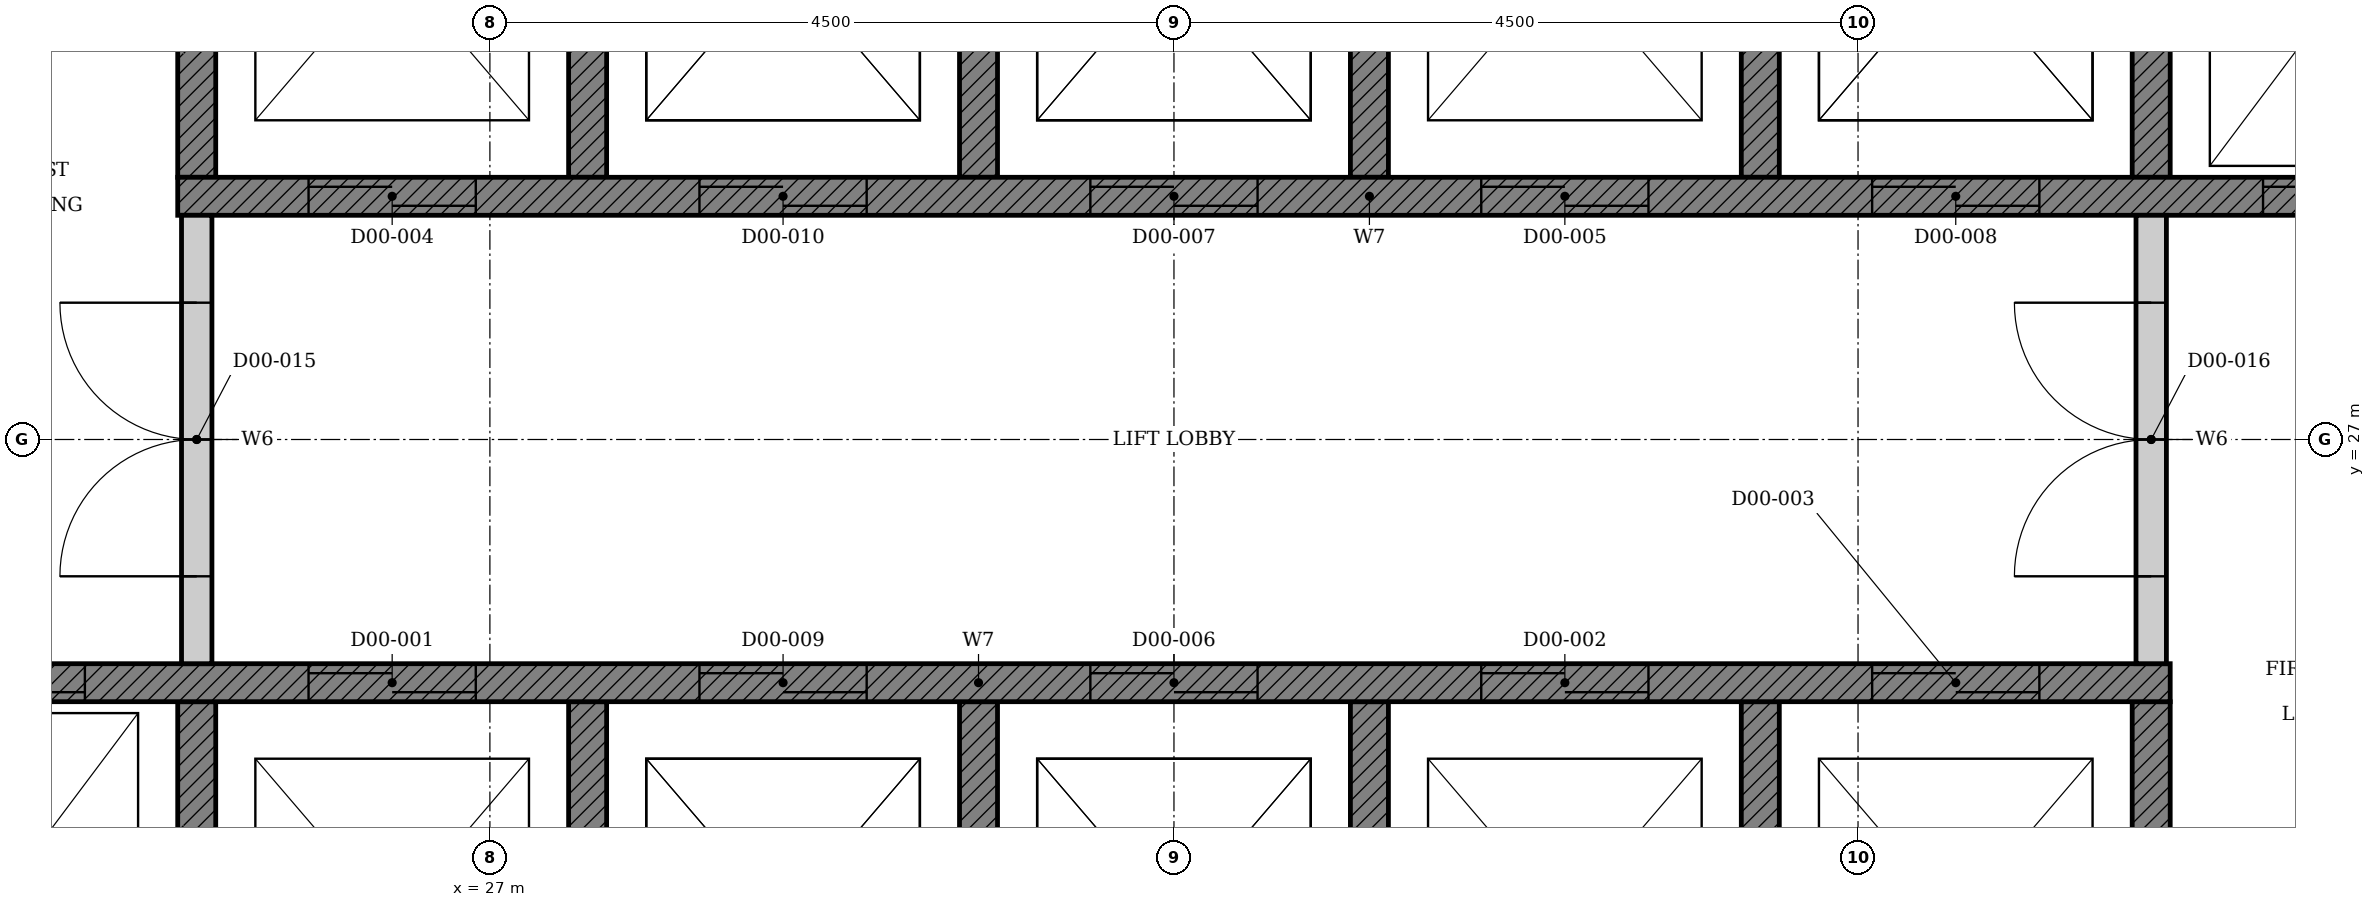
"""IFC4 building model, lengths in metres.
Left out: names, types, materials, properties, quantities, classifications, styles, units other than length and angle.
Written with IfcOpenShell. Run it as: python <this file> out.ifc"""

import sys

from ifc_helpers import new_model, si_unit, direction, frame, frame_2d, origin, place, context, subcontext, project, spatial, polyline, rectangle, outline, extrude, element, fill, save


model = new_model("IFC4")
c1 = context("Model", 3, precision=1e-05, world=origin(), true_north=direction((0.0, 1.0)))
c2 = subcontext(c1, "Body", "Model", "MODEL_VIEW")
j1 = project(units=[si_unit("LENGTHUNIT", "METRE"), si_unit("PLANEANGLEUNIT", "RADIAN")], contexts=[c1])
p1 = place(None, origin())
s1 = spatial("IfcSite", under=j1, at=p1, CompositionType="ELEMENT")
p2 = place(p1, origin())
s2 = spatial("IfcBuilding", under=s1, at=p2, CompositionType="ELEMENT")
p3 = place(p2, origin())
s3 = spatial("IfcBuildingStorey", under=s2, at=p3, CompositionType="ELEMENT", Elevation=0.0)
p4 = place(p3, origin())
e1 = element("IfcWall", 1, at=p4, inside=s3, PredefinedType="SHEAR", context=c2, shape_type="SweptSolid", body=[
    extrude(outline(polyline([(22.375, 22.35), (38.053, 22.35), (38.053, 25.275), (37.803, 25.275), (37.803, 22.65), (35.482, 22.65), (35.482, 25.275), (35.232, 25.275), (35.232, 22.65), (32.911, 22.65), (32.911, 25.275), (32.661, 25.275), (32.661, 22.65), (30.339, 22.65), (30.339, 25.275), (30.089, 25.275), (30.089, 22.65), (27.768, 22.65), (27.768, 25.275), (27.518, 25.275), (27.518, 22.65), (25.197, 22.65), (25.197, 25.275), (24.947, 25.275), (24.947, 22.65), (22.625, 22.65), (22.625, 25.275), (22.375, 25.275), (22.375, 22.35)])), origin(), (0.0, 0.0, 1.0), 6.25),
])
p5 = place(p3, origin())
e2 = element("IfcWall", 2, at=p5, inside=s3, PredefinedType="SHEAR", context=c2, shape_type="SweptSolid", body=[
    extrude(outline(polyline([(24.947, 28.725), (25.197, 28.725), (25.197, 31.35), (27.518, 31.35), (27.518, 28.725), (27.768, 28.725), (27.768, 31.35), (30.089, 31.35), (30.089, 28.725), (30.339, 28.725), (30.339, 31.35), (32.661, 31.35), (32.661, 28.725), (32.911, 28.725), (32.911, 31.35), (35.232, 31.35), (35.232, 28.725), (35.482, 28.725), (35.482, 31.35), (37.803, 31.35), (37.803, 28.725), (38.053, 28.725), (38.053, 31.35), (40.375, 31.35), (40.375, 28.725), (40.625, 28.725), (40.625, 31.65), (24.947, 31.65), (24.947, 28.725)])), origin(), (0.0, 0.0, 1.0), 6.25),
])
p6 = place(p3, frame((22.375, 25.4, 0.0), z_axis=(0.0, 0.0, 1.0), x_axis=(1.0, 0.0, 0.0)))
e3 = element("IfcWall", 3, at=p6, inside=s3, PredefinedType="SHEAR", context=c2, shape_type="SweptSolid", body=[
    extrude(rectangle(XDim=15.678, YDim=0.25, at=frame_2d((7.839, 0.0))), origin(), (0.0, 0.0, 1.0), 6.25),
])
p7 = place(p6, frame((3.432, 0.0, 0.0)))
e4 = element("IfcOpeningElement", 4, at=p7, cuts=e3, PredefinedType="OPENING", context=c2, shape_type="SweptSolid", body=[
    extrude(rectangle(XDim=1.1, YDim=2.1, at=frame_2d((0.55, 1.05))), frame((0.0, 0.135, 0.0), z_axis=(0.0, -1.0, 0.0), x_axis=(1.0, 0.0, 0.0)), (0.0, 0.0, 1.0), 0.27),
])
p8 = place(p6, frame((11.146, 0.0, 0.0)))
e5 = element("IfcOpeningElement", 5, at=p8, cuts=e3, PredefinedType="OPENING", context=c2, shape_type="SweptSolid", body=[
    extrude(rectangle(XDim=1.1, YDim=2.1, at=frame_2d((0.55, 1.05))), frame((0.0, 0.135, 0.0), z_axis=(0.0, -1.0, 0.0), x_axis=(1.0, 0.0, 0.0)), (0.0, 0.0, 1.0), 0.27),
])
p9 = place(p6, frame((13.718, 0.0, 0.0)))
e6 = element("IfcOpeningElement", 6, at=p9, cuts=e3, PredefinedType="OPENING", context=c2, shape_type="SweptSolid", body=[
    extrude(rectangle(XDim=1.1, YDim=2.1, at=frame_2d((0.55, 1.05))), frame((0.0, 0.135, 0.0), z_axis=(0.0, -1.0, 0.0), x_axis=(1.0, 0.0, 0.0)), (0.0, 0.0, 1.0), 0.27),
])
p10 = place(p6, frame((8.575, 0.0, 0.0)))
e7 = element("IfcOpeningElement", 7, at=p10, cuts=e3, PredefinedType="OPENING", context=c2, shape_type="SweptSolid", body=[
    extrude(rectangle(XDim=1.1, YDim=2.1, at=frame_2d((0.55, 1.05))), frame((0.0, 0.135, 0.0), z_axis=(0.0, -1.0, 0.0), x_axis=(1.0, 0.0, 0.0)), (0.0, 0.0, 1.0), 0.27),
])
p11 = place(p6, frame((6.004, 0.0, 0.0)))
e8 = element("IfcOpeningElement", 8, at=p11, cuts=e3, PredefinedType="OPENING", context=c2, shape_type="SweptSolid", body=[
    extrude(rectangle(XDim=1.1, YDim=2.1, at=frame_2d((0.55, 1.05))), frame((0.0, 0.135, 0.0), z_axis=(0.0, -1.0, 0.0), x_axis=(1.0, 0.0, 0.0)), (0.0, 0.0, 1.0), 0.27),
])
p12 = place(p6, frame((0.861, 0.0, 0.0)))
e9 = element("IfcOpeningElement", 9, at=p12, cuts=e3, PredefinedType="OPENING", context=c2, shape_type="SweptSolid", body=[
    extrude(rectangle(XDim=1.1, YDim=2.1, at=frame_2d((0.55, 1.05))), frame((0.0, 0.135, 0.0), z_axis=(0.0, -1.0, 0.0), x_axis=(1.0, 0.0, 0.0)), (0.0, 0.0, 1.0), 0.27),
])
p13 = place(p3, frame((24.947, 28.6, 0.0), z_axis=(0.0, 0.0, 1.0), x_axis=(1.0, 0.0, 0.0)))
e10 = element("IfcWall", 10, at=p13, inside=s3, PredefinedType="SHEAR", context=c2, shape_type="SweptSolid", body=[
    extrude(rectangle(XDim=15.678, YDim=0.25, at=frame_2d((7.839, 0.0))), origin(), (0.0, 0.0, 1.0), 6.25),
])
p14 = place(p13, frame((0.861, 0.0, 0.0)))
e11 = element("IfcOpeningElement", 11, at=p14, cuts=e10, PredefinedType="OPENING", context=c2, shape_type="SweptSolid", body=[
    extrude(rectangle(XDim=1.1, YDim=2.1, at=frame_2d((0.55, 1.05))), frame((0.0, 0.135, 0.0), z_axis=(0.0, -1.0, 0.0), x_axis=(1.0, 0.0, 0.0)), (0.0, 0.0, 1.0), 0.27),
])
p15 = place(p13, frame((8.575, 0.0, 0.0)))
e12 = element("IfcOpeningElement", 12, at=p15, cuts=e10, PredefinedType="OPENING", context=c2, shape_type="SweptSolid", body=[
    extrude(rectangle(XDim=1.1, YDim=2.1, at=frame_2d((0.55, 1.05))), frame((0.0, 0.135, 0.0), z_axis=(0.0, -1.0, 0.0), x_axis=(1.0, 0.0, 0.0)), (0.0, 0.0, 1.0), 0.27),
])
p16 = place(p13, frame((6.004, 0.0, 0.0)))
e13 = element("IfcOpeningElement", 13, at=p16, cuts=e10, PredefinedType="OPENING", context=c2, shape_type="SweptSolid", body=[
    extrude(rectangle(XDim=1.1, YDim=2.1, at=frame_2d((0.55, 1.05))), frame((0.0, 0.135, 0.0), z_axis=(0.0, -1.0, 0.0), x_axis=(1.0, 0.0, 0.0)), (0.0, 0.0, 1.0), 0.27),
])
p17 = place(p13, frame((11.146, 0.0, 0.0)))
e14 = element("IfcOpeningElement", 14, at=p17, cuts=e10, PredefinedType="OPENING", context=c2, shape_type="SweptSolid", body=[
    extrude(rectangle(XDim=1.1, YDim=2.1, at=frame_2d((0.55, 1.05))), frame((0.0, 0.135, 0.0), z_axis=(0.0, -1.0, 0.0), x_axis=(1.0, 0.0, 0.0)), (0.0, 0.0, 1.0), 0.27),
])
p18 = place(p13, frame((3.432, 0.0, 0.0)))
e15 = element("IfcOpeningElement", 15, at=p18, cuts=e10, PredefinedType="OPENING", context=c2, shape_type="SweptSolid", body=[
    extrude(rectangle(XDim=1.1, YDim=2.1, at=frame_2d((0.55, 1.05))), frame((0.0, 0.135, 0.0), z_axis=(0.0, -1.0, 0.0), x_axis=(1.0, 0.0, 0.0)), (0.0, 0.0, 1.0), 0.27),
])
p19 = place(p13, frame((13.718, 0.0, 0.0)))
e16 = element("IfcOpeningElement", 16, at=p19, cuts=e10, PredefinedType="OPENING", context=c2, shape_type="SweptSolid", body=[
    extrude(rectangle(XDim=1.1, YDim=2.1, at=frame_2d((0.55, 1.05))), frame((0.0, 0.135, 0.0), z_axis=(0.0, -1.0, 0.0), x_axis=(1.0, 0.0, 0.0)), (0.0, 0.0, 1.0), 0.27),
])
p20 = place(p3, frame((25.072, 25.525, 0.0), z_axis=(0.0, 0.0, 1.0), x_axis=(0.0, 1.0, 0.0)))
e17 = element("IfcWall", 17, at=p20, inside=s3, PredefinedType="PARTITIONING", context=c2, shape_type="SweptSolid", body=[
    extrude(rectangle(XDim=2.95, YDim=0.2, at=frame_2d((1.475, 0.0))), origin(), (0.0, 0.0, 1.0), 6.25),
])
p21 = place(p20, frame((0.575, 0.0, 0.0)))
e18 = element("IfcOpeningElement", 18, at=p21, cuts=e17, PredefinedType="OPENING", context=c2, shape_type="SweptSolid", body=[
    extrude(rectangle(XDim=1.8, YDim=2.1, at=frame_2d((0.9, 1.05))), frame((0.0, 0.11, 0.0), z_axis=(0.0, -1.0, 0.0), x_axis=(1.0, 0.0, 0.0)), (0.0, 0.0, 1.0), 0.22),
])
p22 = place(p3, frame((37.928, 25.525, 0.0), z_axis=(0.0, 0.0, 1.0), x_axis=(0.0, 1.0, 0.0)))
e19 = element("IfcWall", 19, at=p22, inside=s3, PredefinedType="PARTITIONING", context=c2, shape_type="SweptSolid", body=[
    extrude(rectangle(XDim=2.95, YDim=0.2, at=frame_2d((1.475, 0.0))), origin(), (0.0, 0.0, 1.0), 6.25),
])
p23 = place(p22, frame((0.575, 0.0, 0.0)))
e20 = element("IfcOpeningElement", 20, at=p23, cuts=e19, PredefinedType="OPENING", context=c2, shape_type="SweptSolid", body=[
    extrude(rectangle(XDim=1.8, YDim=2.1, at=frame_2d((0.9, 1.05))), frame((0.0, 0.11, 0.0), z_axis=(0.0, -1.0, 0.0), x_axis=(1.0, 0.0, 0.0)), (0.0, 0.0, 1.0), 0.22),
])
p24 = place(p7, origin())
e21 = element("IfcDoor", 21, at=p24, inside=s3, OperationType="DOUBLE_DOOR_SLIDING", PredefinedType="DOOR", context=c2, shape_type="SweptSolid", body=[
    extrude(rectangle(XDim=1.1, YDim=2.1, at=frame_2d((0.55, 1.05))), frame((0.0, 0.025, 0.0), z_axis=(0.0, -1.0, 0.0), x_axis=(1.0, 0.0, 0.0)), (0.0, 0.0, 1.0), 0.05),
])
fill(e4, e21)
p25 = place(p8, origin())
e22 = element("IfcDoor", 22, at=p25, inside=s3, OperationType="DOUBLE_DOOR_SLIDING", PredefinedType="DOOR", context=c2, shape_type="SweptSolid", body=[
    extrude(rectangle(XDim=1.1, YDim=2.1, at=frame_2d((0.55, 1.05))), frame((0.0, 0.025, 0.0), z_axis=(0.0, -1.0, 0.0), x_axis=(1.0, 0.0, 0.0)), (0.0, 0.0, 1.0), 0.05),
])
fill(e5, e22)
p26 = place(p9, origin())
e23 = element("IfcDoor", 23, at=p26, inside=s3, OperationType="DOUBLE_DOOR_SLIDING", PredefinedType="DOOR", context=c2, shape_type="SweptSolid", body=[
    extrude(rectangle(XDim=1.1, YDim=2.1, at=frame_2d((0.55, 1.05))), frame((0.0, 0.025, 0.0), z_axis=(0.0, -1.0, 0.0), x_axis=(1.0, 0.0, 0.0)), (0.0, 0.0, 1.0), 0.05),
])
fill(e6, e23)
p27 = place(p14, origin())
e24 = element("IfcDoor", 24, at=p27, inside=s3, OperationType="DOUBLE_DOOR_SLIDING", PredefinedType="DOOR", context=c2, shape_type="SweptSolid", body=[
    extrude(rectangle(XDim=1.1, YDim=2.1, at=frame_2d((0.55, 1.05))), frame((0.0, 0.025, 0.0), z_axis=(0.0, -1.0, 0.0), x_axis=(1.0, 0.0, 0.0)), (0.0, 0.0, 1.0), 0.05),
])
fill(e11, e24)
p28 = place(p15, origin())
e25 = element("IfcDoor", 25, at=p28, inside=s3, OperationType="DOUBLE_DOOR_SLIDING", PredefinedType="DOOR", context=c2, shape_type="SweptSolid", body=[
    extrude(rectangle(XDim=1.1, YDim=2.1, at=frame_2d((0.55, 1.05))), frame((0.0, 0.025, 0.0), z_axis=(0.0, -1.0, 0.0), x_axis=(1.0, 0.0, 0.0)), (0.0, 0.0, 1.0), 0.05),
])
fill(e12, e25)
p29 = place(p10, origin())
e26 = element("IfcDoor", 26, at=p29, inside=s3, OperationType="DOUBLE_DOOR_SLIDING", PredefinedType="DOOR", context=c2, shape_type="SweptSolid", body=[
    extrude(rectangle(XDim=1.1, YDim=2.1, at=frame_2d((0.55, 1.05))), frame((0.0, 0.025, 0.0), z_axis=(0.0, -1.0, 0.0), x_axis=(1.0, 0.0, 0.0)), (0.0, 0.0, 1.0), 0.05),
])
fill(e7, e26)
p30 = place(p16, origin())
e27 = element("IfcDoor", 27, at=p30, inside=s3, OperationType="DOUBLE_DOOR_SLIDING", PredefinedType="DOOR", context=c2, shape_type="SweptSolid", body=[
    extrude(rectangle(XDim=1.1, YDim=2.1, at=frame_2d((0.55, 1.05))), frame((0.0, 0.025, 0.0), z_axis=(0.0, -1.0, 0.0), x_axis=(1.0, 0.0, 0.0)), (0.0, 0.0, 1.0), 0.05),
])
fill(e13, e27)
p31 = place(p17, origin())
e28 = element("IfcDoor", 28, at=p31, inside=s3, OperationType="DOUBLE_DOOR_SLIDING", PredefinedType="DOOR", context=c2, shape_type="SweptSolid", body=[
    extrude(rectangle(XDim=1.1, YDim=2.1, at=frame_2d((0.55, 1.05))), frame((0.0, 0.025, 0.0), z_axis=(0.0, -1.0, 0.0), x_axis=(1.0, 0.0, 0.0)), (0.0, 0.0, 1.0), 0.05),
])
fill(e14, e28)
p32 = place(p11, origin())
e29 = element("IfcDoor", 29, at=p32, inside=s3, OperationType="DOUBLE_DOOR_SLIDING", PredefinedType="DOOR", context=c2, shape_type="SweptSolid", body=[
    extrude(rectangle(XDim=1.1, YDim=2.1, at=frame_2d((0.55, 1.05))), frame((0.0, 0.025, 0.0), z_axis=(0.0, -1.0, 0.0), x_axis=(1.0, 0.0, 0.0)), (0.0, 0.0, 1.0), 0.05),
])
fill(e8, e29)
p33 = place(p18, origin())
e30 = element("IfcDoor", 30, at=p33, inside=s3, OperationType="DOUBLE_DOOR_SLIDING", PredefinedType="DOOR", context=c2, shape_type="SweptSolid", body=[
    extrude(rectangle(XDim=1.1, YDim=2.1, at=frame_2d((0.55, 1.05))), frame((0.0, 0.025, 0.0), z_axis=(0.0, -1.0, 0.0), x_axis=(1.0, 0.0, 0.0)), (0.0, 0.0, 1.0), 0.05),
])
fill(e15, e30)
p34 = place(p12, origin())
e31 = element("IfcDoor", 31, at=p34, inside=s3, OperationType="DOUBLE_DOOR_SLIDING", PredefinedType="DOOR", context=c2, shape_type="SweptSolid", body=[
    extrude(rectangle(XDim=1.1, YDim=2.1, at=frame_2d((0.55, 1.05))), frame((0.0, 0.025, 0.0), z_axis=(0.0, -1.0, 0.0), x_axis=(1.0, 0.0, 0.0)), (0.0, 0.0, 1.0), 0.05),
])
fill(e9, e31)
p35 = place(p19, origin())
e32 = element("IfcDoor", 32, at=p35, inside=s3, OperationType="DOUBLE_DOOR_SLIDING", PredefinedType="DOOR", context=c2, shape_type="SweptSolid", body=[
    extrude(rectangle(XDim=1.1, YDim=2.1, at=frame_2d((0.55, 1.05))), frame((0.0, 0.025, 0.0), z_axis=(0.0, -1.0, 0.0), x_axis=(1.0, 0.0, 0.0)), (0.0, 0.0, 1.0), 0.05),
])
fill(e16, e32)
p36 = place(p21, origin())
e33 = element("IfcDoor", 33, at=p36, inside=s3, OperationType="DOUBLE_DOOR_SINGLE_SWING", PredefinedType="DOOR", context=c2, shape_type="SweptSolid", body=[
    extrude(rectangle(XDim=1.8, YDim=2.1, at=frame_2d((0.9, 1.05))), frame((0.0, 0.025, 0.0), z_axis=(0.0, -1.0, 0.0), x_axis=(1.0, 0.0, 0.0)), (0.0, 0.0, 1.0), 0.05),
])
fill(e18, e33)
p37 = place(p23, origin())
e34 = element("IfcDoor", 34, at=p37, inside=s3, OperationType="DOUBLE_DOOR_SINGLE_SWING", PredefinedType="DOOR", context=c2, shape_type="SweptSolid", body=[
    extrude(rectangle(XDim=1.8, YDim=2.1, at=frame_2d((0.9, 1.05))), frame((0.0, 0.025, 0.0), z_axis=(0.0, -1.0, 0.0), x_axis=(1.0, 0.0, 0.0)), (0.0, 0.0, 1.0), 0.05),
])
fill(e20, e34)
save(model, sys.argv[1])
